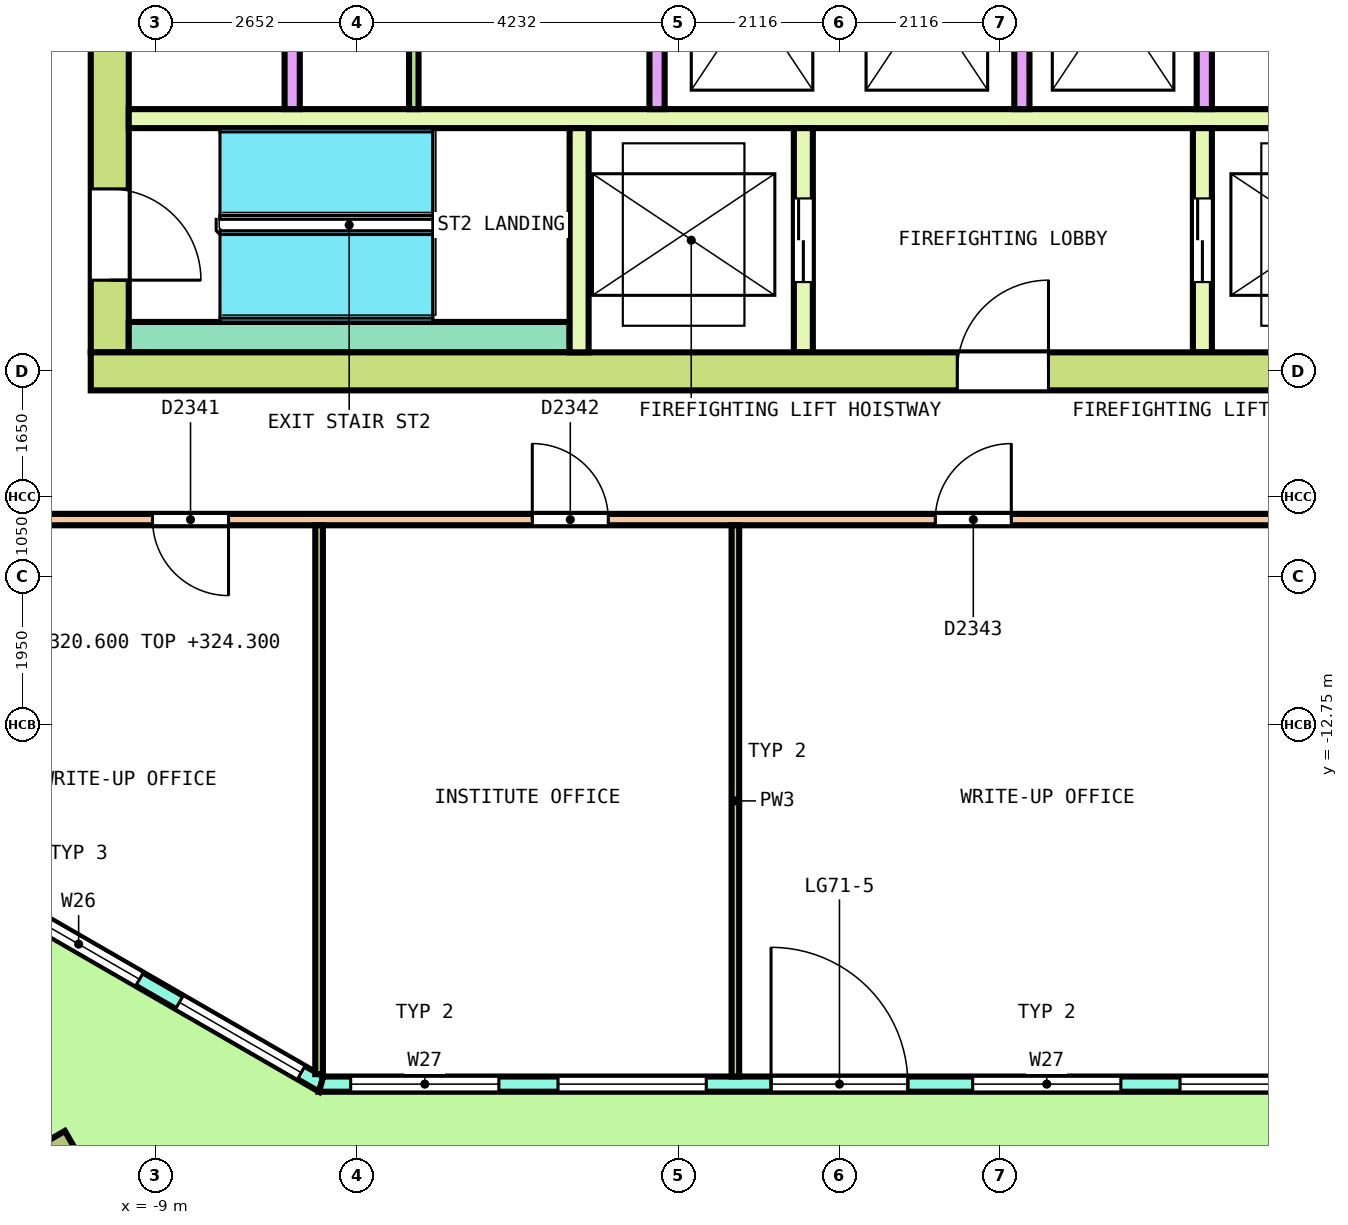
"""IFC4 building model, lengths in metres.
Left out: names, types, materials, properties, quantities, classifications, styles, units other than length and angle.
Written with IfcOpenShell. Run it as: python <this file> out.ifc"""

import sys

from ifc_helpers import new_model, si_unit, direction, frame, frame_2d, origin, origin_2d, place, context, subcontext, project, spatial, polyline, rectangle, outline, extrude, element, fill, save


model = new_model("IFC4")
c1 = context("Model", 3, precision=1e-05, world=origin(), true_north=direction((0.0, 1.0)))
c2 = subcontext(c1, "Body", "Model", "MODEL_VIEW")
j1 = project(units=[si_unit("LENGTHUNIT", "METRE"), si_unit("PLANEANGLEUNIT", "RADIAN")], contexts=[c1])
p1 = place(None, origin())
s1 = spatial("IfcSite", under=j1, at=p1, CompositionType="ELEMENT")
p2 = place(p1, origin())
s2 = spatial("IfcBuilding", under=s1, at=p2, CompositionType="ELEMENT")
p3 = place(p2, frame((0.0, 0.0, 320.6)))
s3 = spatial("IfcBuildingStorey", under=s2, at=p3, CompositionType="ELEMENT", Elevation=320.6)
p4 = place(p3, frame((-10.346, -18.674, 0.0), z_axis=(0.018115165867, -0.031417446337, 0.999342176049), x_axis=(0.865818316477, -0.499372659284, -0.031394107935)))
e1 = element("IfcColumn", 1, at=p4, inside=s3, PredefinedType="COLUMN", context=c2, shape_type="SweptSolid", body=[
    extrude(rectangle(XDim=0.85, YDim=0.85, at=origin_2d()), origin(), (0.0, 0.0, 1.0), 3.652),
])
p5 = place(p3, frame((-11.073, -15.021, 0.0), z_axis=(0.0, 0.0, 1.0), x_axis=(0.866029143232, -0.499993523031, 0.0)))
e2 = element("IfcWall", 2, at=p5, inside=s3, PredefinedType="SOLIDWALL", context=c2, shape_type="SweptSolid", body=[
    extrude(outline(polyline([(-0.027, -0.1), (1.214, -0.1), (2.456, -0.1), (3.697, -0.1), (4.938, -0.1), (4.885, 0.1), (3.67, 0.1), (2.456, 0.1), (1.241, 0.1), (0.027, 0.1), (-0.027, -0.1)])), origin(), (0.0, 0.0, 1.0), 3.7),
])
p6 = place(p5, frame((0.303, 0.0, 0.1)))
e3 = element("IfcOpeningElement", 3, at=p6, cuts=e2, PredefinedType="OPENING", context=c2, shape_type="SweptSolid", body=[
    extrude(rectangle(XDim=1.85, YDim=2.9, at=frame_2d((0.925, 1.45))), frame((0.0, 0.11, 0.0), z_axis=(0.0, -1.0, 0.0), x_axis=(1.0, 0.0, 0.0)), (0.0, 0.0, 1.0), 0.22),
])
p7 = place(p5, frame((2.759, 0.0, 0.1)))
e4 = element("IfcOpeningElement", 4, at=p7, cuts=e2, PredefinedType="OPENING", context=c2, shape_type="SweptSolid", body=[
    extrude(rectangle(XDim=1.85, YDim=2.9, at=frame_2d((0.925, 1.45))), frame((0.0, 0.11, 0.0), z_axis=(0.0, -1.0, 0.0), x_axis=(1.0, 0.0, 0.0)), (0.0, 0.0, 1.0), 0.22),
])
p8 = place(p3, frame((-6.819, -17.477, 0.0), z_axis=(0.0, 0.0, 1.0), x_axis=(1.0, 0.0, 0.0)))
e5 = element("IfcWall", 5, at=p8, inside=s3, PredefinedType="SOLIDWALL", context=c2, shape_type="SweptSolid", body=[
    extrude(outline(polyline([(-0.027, -0.1), (1.026, -0.1), (2.08, -0.1), (3.133, -0.1), (4.186, -0.1), (5.239, -0.1), (6.292, -0.1), (7.346, -0.1), (8.399, -0.1), (9.452, -0.1), (10.505, -0.1), (11.559, -0.1), (12.612, -0.1), (13.665, -0.1), (13.611, 0.1), (12.566, 0.1), (11.521, 0.1), (10.477, 0.1), (9.431, 0.1), (8.386, 0.1), (7.342, 0.1), (6.297, 0.1), (5.252, 0.1), (4.207, 0.1), (3.162, 0.1), (2.117, 0.1), (1.072, 0.1), (0.027, 0.1), (-0.027, -0.1)])), origin(), (0.0, 0.0, 1.0), 3.7),
])
p9 = place(p8, frame((0.389, 0.0, 0.1)))
e6 = element("IfcOpeningElement", 6, at=p9, cuts=e5, PredefinedType="OPENING", context=c2, shape_type="SweptSolid", body=[
    extrude(rectangle(XDim=1.95, YDim=2.9, at=frame_2d((0.975, 1.45))), frame((0.0, 0.11, 0.0), z_axis=(0.0, -1.0, 0.0), x_axis=(1.0, 0.0, 0.0)), (0.0, 0.0, 1.0), 0.22),
])
p10 = place(p8, frame((3.116, 0.0, 0.1)))
e7 = element("IfcOpeningElement", 7, at=p10, cuts=e5, PredefinedType="OPENING", context=c2, shape_type="SweptSolid", body=[
    extrude(rectangle(XDim=1.95, YDim=2.9, at=frame_2d((0.975, 1.45))), frame((0.0, 0.11, 0.0), z_axis=(0.0, -1.0, 0.0), x_axis=(1.0, 0.0, 0.0)), (0.0, 0.0, 1.0), 0.22),
])
p11 = place(p8, frame((5.919, 0.0, 0.0)))
e8 = element("IfcOpeningElement", 8, at=p11, cuts=e5, PredefinedType="OPENING", context=c2, shape_type="SweptSolid", body=[
    extrude(rectangle(XDim=1.8, YDim=2.4, at=frame_2d((0.9, 1.2))), frame((0.0, 0.11, 0.0), z_axis=(0.0, -1.0, 0.0), x_axis=(1.0, 0.0, 0.0)), (0.0, 0.0, 1.0), 0.22),
])
p12 = place(p8, frame((5.919, 0.0, 2.55)))
e9 = element("IfcOpeningElement", 9, at=p12, cuts=e5, PredefinedType="OPENING", context=c2, shape_type="SweptSolid", body=[
    extrude(rectangle(XDim=1.8, YDim=0.45, at=frame_2d((0.9, 0.225))), frame((0.0, 0.11, 0.0), z_axis=(0.0, -1.0, 0.0), x_axis=(1.0, 0.0, 0.0)), (0.0, 0.0, 1.0), 0.22),
])
p13 = place(p8, frame((8.572, 0.0, 0.1)))
e10 = element("IfcOpeningElement", 10, at=p13, cuts=e5, PredefinedType="OPENING", context=c2, shape_type="SweptSolid", body=[
    extrude(rectangle(XDim=1.95, YDim=2.9, at=frame_2d((0.975, 1.45))), frame((0.0, 0.11, 0.0), z_axis=(0.0, -1.0, 0.0), x_axis=(1.0, 0.0, 0.0)), (0.0, 0.0, 1.0), 0.22),
])
p14 = place(p8, frame((11.3, 0.0, 0.1)))
e11 = element("IfcOpeningElement", 11, at=p14, cuts=e5, PredefinedType="OPENING", context=c2, shape_type="SweptSolid", body=[
    extrude(rectangle(XDim=1.95, YDim=2.9, at=frame_2d((0.975, 1.45))), frame((0.0, 0.11, 0.0), z_axis=(0.0, -1.0, 0.0), x_axis=(1.0, 0.0, 0.0)), (0.0, 0.0, 1.0), 0.22),
])
p15 = place(p3, frame((-9.85, -8.1, 0.0), z_axis=(0.0, 0.0, 1.0), x_axis=(1.0, 0.0, 0.0)))
e12 = element("IfcWall", 12, at=p15, inside=s3, PredefinedType="SHEAR", context=c2, shape_type="SweptSolid", body=[
    extrude(rectangle(XDim=19.7, YDim=0.5, at=frame_2d((9.85, 0.0))), origin(), (0.0, 0.0, 1.0), 3.7),
])
p16 = place(p15, frame((11.4, 0.0, 0.0)))
e13 = element("IfcOpeningElement", 13, at=p16, cuts=e12, PredefinedType="OPENING", context=c2, shape_type="SweptSolid", body=[
    extrude(rectangle(XDim=1.2, YDim=2.1, at=frame_2d((0.6, 1.05))), frame((0.0, 0.26, 0.0), z_axis=(0.0, -1.0, 0.0), x_axis=(1.0, 0.0, 0.0)), (0.0, 0.0, 1.0), 0.52),
])
p17 = place(p3, frame((-9.6, -7.85, 0.0), z_axis=(0.0, 0.0, 1.0), x_axis=(0.0, 1.0, 0.0)))
e14 = element("IfcWall", 14, at=p17, inside=s3, PredefinedType="SHEAR", context=c2, shape_type="SweptSolid", body=[
    extrude(rectangle(XDim=15.7, YDim=0.5, at=frame_2d((7.85, 0.0))), origin(), (0.0, 0.0, 1.0), 3.7),
])
p18 = place(p17, frame((6.65, 0.0, 0.0)))
e15 = element("IfcOpeningElement", 15, at=p18, cuts=e14, PredefinedType="OPENING", context=c2, shape_type="SweptSolid", body=[
    extrude(rectangle(XDim=2.4, YDim=2.1, at=frame_2d((1.2, 1.05))), frame((0.0, 0.26, 0.0), z_axis=(0.0, -1.0, 0.0), x_axis=(1.0, 0.0, 0.0)), (0.0, 0.0, 1.0), 0.52),
])
p19 = place(p17, frame((13.55, 0.0, 0.0)))
e16 = element("IfcOpeningElement", 16, at=p19, cuts=e14, PredefinedType="OPENING", context=c2, shape_type="SweptSolid", body=[
    extrude(rectangle(XDim=1.2, YDim=2.1, at=frame_2d((0.6, 1.05))), frame((0.0, 0.26, 0.0), z_axis=(0.0, -1.0, 0.0), x_axis=(1.0, 0.0, 0.0)), (0.0, 0.0, 1.0), 0.52),
])
p20 = place(p17, frame((0.95, 0.0, 0.0)))
e17 = element("IfcOpeningElement", 17, at=p20, cuts=e14, PredefinedType="OPENING", context=c2, shape_type="SweptSolid", body=[
    extrude(rectangle(XDim=1.2, YDim=2.1, at=frame_2d((0.6, 1.05))), frame((0.0, 0.26, 0.0), z_axis=(0.0, -1.0, 0.0), x_axis=(1.0, 0.0, 0.0)), (0.0, 0.0, 1.0), 0.52),
])
p21 = place(p3, frame((-9.35, -4.775, 0.0), z_axis=(0.0, 0.0, 1.0), x_axis=(1.0, 0.0, 0.0)))
e18 = element("IfcWall", 18, at=p21, inside=s3, PredefinedType="SOLIDWALL", context=c2, shape_type="SweptSolid", body=[
    extrude(rectangle(XDim=18.7, YDim=0.25, at=frame_2d((9.35, 0.0))), origin(), (0.0, 0.0, 1.0), 3.7),
])
for number, where, z_axis, x_axis in (
    (19, (-7.2, -4.65, 0.0), (0.0, 0.0, 1.0), (0.0, 1.0, 0.0)),
    (20, (-2.4, -4.65, 0.0), (0.0, 0.0, 1.0), (0.0, 1.0, 0.0)),
    (21, (2.4, -4.65, 0.0), (0.0, 0.0, 1.0), (0.0, 1.0, 0.0)),
    (22, (4.8, -4.65, 0.0), (0.0, 0.0, 1.0), (0.0, 1.0, 0.0)),
):
    element("IfcWall", number, at=place(p3, frame(where, z_axis=z_axis, x_axis=x_axis)), inside=s3, PredefinedType="SOLIDWALL", context=c2, shape_type="SweptSolid", body=[
        extrude(rectangle(XDim=2.9, YDim=0.2, at=frame_2d((1.45, 0.0))), origin(), (0.0, 0.0, 1.0), 3.7),
    ])
p22 = place(p3, frame((-9.35, -7.65, 0.0), z_axis=(0.0, 0.0, 1.0), x_axis=(1.0, 0.0, 0.0)))
e23 = element("IfcWall", 23, at=p22, inside=s3, PredefinedType="SOLIDWALL", context=c2, shape_type="SweptSolid", body=[
    extrude(rectangle(XDim=5.8, YDim=0.4, at=frame_2d((2.9, 0.0))), origin(), (0.0, 0.0, 1.0), 3.7),
])
p23 = place(p3, frame((-3.425, -7.85, 0.0), z_axis=(0.0, 0.0, 1.0), x_axis=(0.0, 1.0, 0.0)))
e24 = element("IfcWall", 24, at=p23, inside=s3, PredefinedType="SOLIDWALL", context=c2, shape_type="SweptSolid", body=[
    extrude(rectangle(XDim=2.95, YDim=0.25, at=frame_2d((1.475, 0.0))), origin(), (0.0, 0.0, 1.0), 3.7),
])
p24 = place(p3, frame((-0.475, -7.85, 0.0), z_axis=(0.0, 0.0, 1.0), x_axis=(0.0, 1.0, 0.0)))
e25 = element("IfcWall", 25, at=p24, inside=s3, PredefinedType="SOLIDWALL", context=c2, shape_type="SweptSolid", body=[
    extrude(rectangle(XDim=2.95, YDim=0.25, at=frame_2d((1.475, 0.0))), origin(), (0.0, 0.0, 1.0), 3.7),
])
p25 = place(p24, frame((0.925, 0.0, 0.0)))
e26 = element("IfcOpeningElement", 26, at=p25, cuts=e25, PredefinedType="OPENING", context=c2, shape_type="SweptSolid", body=[
    extrude(rectangle(XDim=1.1, YDim=2.1, at=frame_2d((0.55, 1.05))), frame((0.0, 0.135, 0.0), z_axis=(0.0, -1.0, 0.0), x_axis=(1.0, 0.0, 0.0)), (0.0, 0.0, 1.0), 0.27),
])
p26 = place(p3, frame((4.775, -7.85, 0.0), z_axis=(0.0, 0.0, 1.0), x_axis=(0.0, 1.0, 0.0)))
e27 = element("IfcWall", 27, at=p26, inside=s3, PredefinedType="SOLIDWALL", context=c2, shape_type="SweptSolid", body=[
    extrude(rectangle(XDim=2.95, YDim=0.25, at=frame_2d((1.475, 0.0))), origin(), (0.0, 0.0, 1.0), 3.7),
])
p27 = place(p26, frame((0.925, 0.0, 0.0)))
e28 = element("IfcOpeningElement", 28, at=p27, cuts=e27, PredefinedType="OPENING", context=c2, shape_type="SweptSolid", body=[
    extrude(rectangle(XDim=1.1, YDim=2.1, at=frame_2d((0.55, 1.05))), frame((0.0, 0.135, 0.0), z_axis=(0.0, -1.0, 0.0), x_axis=(1.0, 0.0, 0.0)), (0.0, 0.0, 1.0), 0.27),
])
p28 = place(p3, frame((-5.6, -4.65, 0.0), z_axis=(0.0, 0.0, 1.0), x_axis=(0.0, 1.0, 0.0)))
e29 = element("IfcWall", 29, at=p28, inside=s3, PredefinedType="PARTITIONING", context=c2, shape_type="SweptSolid", body=[
    extrude(rectangle(XDim=2.9, YDim=0.125, at=frame_2d((1.45, 0.0))), origin(), (0.0, 0.0, 1.0), 3.7),
])
p29 = place(p3, frame((-11.025, -10.05, 0.0), z_axis=(0.0, 0.0, 1.0), x_axis=(1.0, 0.0, 0.0)))
e30 = element("IfcWall", 30, at=p29, inside=s3, PredefinedType="PARTITIONING", context=c2, shape_type="SweptSolid", body=[
    extrude(rectangle(XDim=21.925, YDim=0.15, at=frame_2d((10.962, 0.0))), origin(), (0.0, 0.0, 1.0), 3.05),
])
p30 = place(p29, frame((1.988, 0.0, 0.0)))
e31 = element("IfcOpeningElement", 31, at=p30, cuts=e30, PredefinedType="OPENING", context=c2, shape_type="SweptSolid", body=[
    extrude(rectangle(XDim=1.0, YDim=2.1, at=frame_2d((0.5, 1.05))), frame((0.0, 0.085, 0.0), z_axis=(0.0, -1.0, 0.0), x_axis=(1.0, 0.0, 0.0)), (0.0, 0.0, 1.0), 0.17),
])
p31 = place(p29, frame((6.984, 0.0, 0.0)))
e32 = element("IfcOpeningElement", 32, at=p31, cuts=e30, PredefinedType="OPENING", context=c2, shape_type="SweptSolid", body=[
    extrude(rectangle(XDim=1.0, YDim=2.1, at=frame_2d((0.5, 1.05))), frame((0.0, 0.085, 0.0), z_axis=(0.0, -1.0, 0.0), x_axis=(1.0, 0.0, 0.0)), (0.0, 0.0, 1.0), 0.17),
])
p32 = place(p29, frame((12.286, 0.0, 0.0)))
e33 = element("IfcOpeningElement", 33, at=p32, cuts=e30, PredefinedType="OPENING", context=c2, shape_type="SweptSolid", body=[
    extrude(rectangle(XDim=1.0, YDim=2.1, at=frame_2d((0.5, 1.05))), frame((0.0, 0.085, 0.0), z_axis=(0.0, -1.0, 0.0), x_axis=(1.0, 0.0, 0.0)), (0.0, 0.0, 1.0), 0.17),
])
p33 = place(p29, frame((18.378, 0.0, 0.0)))
e34 = element("IfcOpeningElement", 34, at=p33, cuts=e30, PredefinedType="OPENING", context=c2, shape_type="SweptSolid", body=[
    extrude(rectangle(XDim=1.0, YDim=2.1, at=frame_2d((0.5, 1.05))), frame((0.0, 0.085, 0.0), z_axis=(0.0, -1.0, 0.0), x_axis=(1.0, 0.0, 0.0)), (0.0, 0.0, 1.0), 0.17),
])
p34 = place(p29, frame((20.562, 0.0, 0.0)))
e35 = element("IfcOpeningElement", 35, at=p34, cuts=e30, PredefinedType="OPENING", context=c2, shape_type="SweptSolid", body=[
    extrude(rectangle(XDim=1.0, YDim=2.1, at=frame_2d((0.5, 1.05))), frame((0.0, 0.085, 0.0), z_axis=(0.0, -1.0, 0.0), x_axis=(1.0, 0.0, 0.0)), (0.0, 0.0, 1.0), 0.17),
])
p35 = place(p3, frame((-6.846, -17.346, 0.0), z_axis=(0.0, 0.0, 1.0), x_axis=(0.0, 1.0, 0.0)))
e36 = element("IfcWall", 36, at=p35, inside=s3, PredefinedType="PARTITIONING", context=c2, shape_type="SweptSolid", body=[
    extrude(rectangle(XDim=7.221, YDim=0.1, at=frame_2d((3.611, 0.0))), origin(), (0.0, 0.0, 1.0), 3.05),
])
p36 = place(p3, frame((-1.369, -17.377, 0.0), z_axis=(0.0, 0.0, 1.0), x_axis=(0.0, 1.0, 0.0)))
e37 = element("IfcWall", 37, at=p36, inside=s3, PredefinedType="PARTITIONING", context=c2, shape_type="SweptSolid", body=[
    extrude(rectangle(XDim=7.252, YDim=0.1, at=frame_2d((3.626, 0.0))), origin(), (0.0, 0.0, 1.0), 3.05),
])
p37 = place(p6, origin())
e38 = element("IfcWindow", 38, at=p37, inside=s3, PartitioningType="SINGLE_PANEL", PredefinedType="WINDOW", context=c2, shape_type="SweptSolid", body=[
    extrude(rectangle(XDim=1.85, YDim=2.9, at=frame_2d((0.925, 1.45))), frame((0.0, 0.03, 0.0), z_axis=(0.0, -1.0, 0.0), x_axis=(1.0, 0.0, 0.0)), (0.0, 0.0, 1.0), 0.06),
])
fill(e3, e38)
p38 = place(p7, origin())
e39 = element("IfcWindow", 39, at=p38, inside=s3, PartitioningType="SINGLE_PANEL", PredefinedType="WINDOW", context=c2, shape_type="SweptSolid", body=[
    extrude(rectangle(XDim=1.85, YDim=2.9, at=frame_2d((0.925, 1.45))), frame((0.0, 0.03, 0.0), z_axis=(0.0, -1.0, 0.0), x_axis=(1.0, 0.0, 0.0)), (0.0, 0.0, 1.0), 0.06),
])
fill(e4, e39)
p39 = place(p9, origin())
e40 = element("IfcWindow", 40, at=p39, inside=s3, PartitioningType="SINGLE_PANEL", PredefinedType="WINDOW", context=c2, shape_type="SweptSolid", body=[
    extrude(rectangle(XDim=1.95, YDim=2.9, at=frame_2d((0.975, 1.45))), frame((0.0, 0.03, 0.0), z_axis=(0.0, -1.0, 0.0), x_axis=(1.0, 0.0, 0.0)), (0.0, 0.0, 1.0), 0.06),
])
fill(e6, e40)
p40 = place(p10, origin())
e41 = element("IfcWindow", 41, at=p40, inside=s3, PartitioningType="SINGLE_PANEL", PredefinedType="WINDOW", context=c2, shape_type="SweptSolid", body=[
    extrude(rectangle(XDim=1.95, YDim=2.9, at=frame_2d((0.975, 1.45))), frame((0.0, 0.03, 0.0), z_axis=(0.0, -1.0, 0.0), x_axis=(1.0, 0.0, 0.0)), (0.0, 0.0, 1.0), 0.06),
])
fill(e7, e41)
p41 = place(p11, origin())
e42 = element("IfcDoor", 42, at=p41, inside=s3, OperationType="DOUBLE_DOOR_SINGLE_SWING", PredefinedType="DOOR", context=c2, shape_type="SweptSolid", body=[
    extrude(rectangle(XDim=1.8, YDim=2.4, at=frame_2d((0.9, 1.2))), frame((0.0, 0.025, 0.0), z_axis=(0.0, -1.0, 0.0), x_axis=(1.0, 0.0, 0.0)), (0.0, 0.0, 1.0), 0.05),
])
fill(e8, e42)
p42 = place(p12, origin())
e43 = element("IfcWindow", 43, at=p42, inside=s3, PartitioningType="SINGLE_PANEL", PredefinedType="WINDOW", context=c2, shape_type="SweptSolid", body=[
    extrude(rectangle(XDim=1.8, YDim=0.45, at=frame_2d((0.9, 0.225))), frame((0.0, 0.03, 0.0), z_axis=(0.0, -1.0, 0.0), x_axis=(1.0, 0.0, 0.0)), (0.0, 0.0, 1.0), 0.06),
])
fill(e9, e43)
p43 = place(p13, origin())
e44 = element("IfcWindow", 44, at=p43, inside=s3, PartitioningType="SINGLE_PANEL", PredefinedType="WINDOW", context=c2, shape_type="SweptSolid", body=[
    extrude(rectangle(XDim=1.95, YDim=2.9, at=frame_2d((0.975, 1.45))), frame((0.0, 0.03, 0.0), z_axis=(0.0, -1.0, 0.0), x_axis=(1.0, 0.0, 0.0)), (0.0, 0.0, 1.0), 0.06),
])
fill(e10, e44)
p44 = place(p14, origin())
e45 = element("IfcWindow", 45, at=p44, inside=s3, PartitioningType="SINGLE_PANEL", PredefinedType="WINDOW", context=c2, shape_type="SweptSolid", body=[
    extrude(rectangle(XDim=1.95, YDim=2.9, at=frame_2d((0.975, 1.45))), frame((0.0, 0.03, 0.0), z_axis=(0.0, -1.0, 0.0), x_axis=(1.0, 0.0, 0.0)), (0.0, 0.0, 1.0), 0.06),
])
fill(e11, e45)
p45 = place(p25, origin())
e46 = element("IfcDoor", 46, at=p45, inside=s3, OperationType="DOUBLE_DOOR_SLIDING", PredefinedType="DOOR", context=c2, shape_type="SweptSolid", body=[
    extrude(rectangle(XDim=1.1, YDim=2.1, at=frame_2d((0.55, 1.05))), frame((0.0, 0.075, 0.0), z_axis=(0.0, -1.0, 0.0), x_axis=(1.0, 0.0, 0.0)), (0.0, 0.0, 1.0), 0.15),
])
fill(e26, e46)
p46 = place(p27, origin())
e47 = element("IfcDoor", 47, at=p46, inside=s3, OperationType="DOUBLE_DOOR_SLIDING", PredefinedType="DOOR", context=c2, shape_type="SweptSolid", body=[
    extrude(rectangle(XDim=1.1, YDim=2.1, at=frame_2d((0.55, 1.05))), frame((0.0, 0.075, 0.0), z_axis=(0.0, -1.0, 0.0), x_axis=(1.0, 0.0, 0.0)), (0.0, 0.0, 1.0), 0.15),
])
fill(e28, e47)
p47 = place(p20, origin())
e48 = element("IfcDoor", 48, at=p47, inside=s3, OperationType="SINGLE_SWING_LEFT", PredefinedType="DOOR", context=c2, shape_type="SweptSolid", body=[
    extrude(rectangle(XDim=1.2, YDim=2.1, at=frame_2d((0.6, 1.05))), frame((0.0, 0.2, 0.0), z_axis=(0.0, -1.0, 0.0), x_axis=(1.0, 0.0, 0.0)), (0.0, 0.0, 1.0), 0.4),
])
fill(e17, e48)
p48 = place(p16, origin())
e49 = element("IfcDoor", 49, at=p48, inside=s3, OperationType="SINGLE_SWING_LEFT", PredefinedType="DOOR", context=c2, shape_type="SweptSolid", body=[
    extrude(rectangle(XDim=1.2, YDim=2.1, at=frame_2d((0.6, 1.05))), frame((0.0, 0.2, 0.0), z_axis=(0.0, -1.0, 0.0), x_axis=(1.0, 0.0, 0.0)), (0.0, 0.0, 1.0), 0.4),
])
fill(e13, e49)
p49 = place(p30, origin())
e50 = element("IfcDoor", 50, at=p49, inside=s3, OperationType="SINGLE_SWING_RIGHT", PredefinedType="DOOR", context=c2, shape_type="SweptSolid", body=[
    extrude(rectangle(XDim=1.0, YDim=2.1, at=frame_2d((0.5, 1.05))), frame((0.0, 0.025, 0.0), z_axis=(0.0, -1.0, 0.0), x_axis=(1.0, 0.0, 0.0)), (0.0, 0.0, 1.0), 0.05),
])
fill(e31, e50)
p50 = place(p31, origin())
e51 = element("IfcDoor", 51, at=p50, inside=s3, OperationType="SINGLE_SWING_LEFT", PredefinedType="DOOR", context=c2, shape_type="SweptSolid", body=[
    extrude(rectangle(XDim=1.0, YDim=2.1, at=frame_2d((0.5, 1.05))), frame((0.0, 0.025, 0.0), z_axis=(0.0, -1.0, 0.0), x_axis=(1.0, 0.0, 0.0)), (0.0, 0.0, 1.0), 0.05),
])
fill(e32, e51)
p51 = place(p32, origin())
e52 = element("IfcDoor", 52, at=p51, inside=s3, OperationType="SINGLE_SWING_LEFT", PredefinedType="DOOR", context=c2, shape_type="SweptSolid", body=[
    extrude(rectangle(XDim=1.0, YDim=2.1, at=frame_2d((0.5, 1.05))), frame((0.0, 0.025, 0.0), z_axis=(0.0, -1.0, 0.0), x_axis=(1.0, 0.0, 0.0)), (0.0, 0.0, 1.0), 0.05),
])
fill(e33, e52)
save(model, sys.argv[1])
